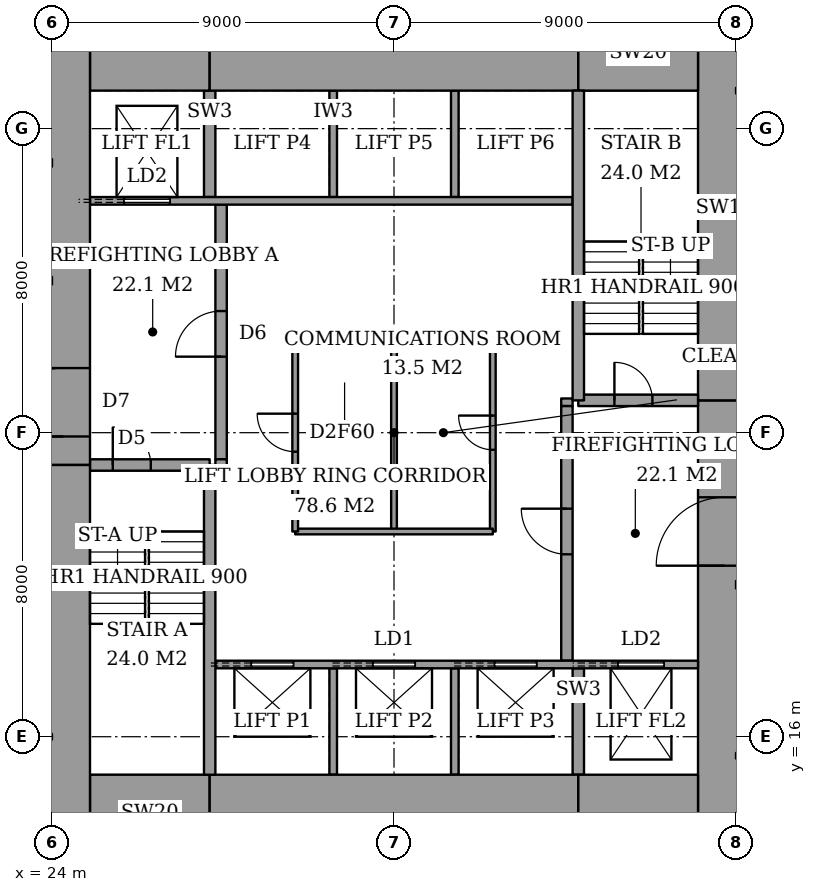
"""IFC4 building model, lengths in metres.
Left out: names, types, materials, properties, quantities, classifications, styles, units other than length and angle.
Written with IfcOpenShell. Run it as: python <this file> out.ifc"""

import sys

from ifc_helpers import new_model, si_unit, direction, frame, frame_2d, origin, place, context, subcontext, project, spatial, rectangle, extrude, element, fill, save


model = new_model("IFC4")
c1 = context("Model", 3, precision=1e-05, world=origin(), true_north=direction((0.0, 1.0)))
c2 = subcontext(c1, "Body", "Model", "MODEL_VIEW")
j1 = project(units=[si_unit("LENGTHUNIT", "METRE"), si_unit("PLANEANGLEUNIT", "RADIAN")], contexts=[c1])
p1 = place(None, origin())
s1 = spatial("IfcSite", under=j1, at=p1, CompositionType="ELEMENT")
p2 = place(p1, origin())
s2 = spatial("IfcBuilding", under=s1, at=p2, CompositionType="ELEMENT")
p3 = place(p2, frame((0.0, 0.0, 36.8)))
s3 = spatial("IfcBuildingStorey", under=s2, at=p3, CompositionType="ELEMENT", Elevation=36.8)
p4 = place(p3, frame((25.0, 14.0, 0.0), z_axis=(0.0, 0.0, 1.0), x_axis=(1.0, 0.0, 0.0)))
e1 = element("IfcWall", 1, at=p4, inside=s3, PredefinedType="SHEAR", context=c2, shape_type="SweptSolid", body=[
    extrude(rectangle(XDim=3.15, YDim=2.0, at=frame_2d((1.575, 0.0))), origin(), (0.0, 0.0, 1.0), 3.6),
])
p5 = place(p3, frame((28.15, 14.0, 0.0), z_axis=(0.0, 0.0, 1.0), x_axis=(1.0, 0.0, 0.0)))
e2 = element("IfcWall", 2, at=p5, inside=s3, PredefinedType="SHEAR", context=c2, shape_type="SweptSolid", body=[
    extrude(rectangle(XDim=9.7, YDim=2.0, at=frame_2d((4.85, 0.0))), origin(), (0.0, 0.0, 1.0), 3.6),
])
for number, where, z_axis, x_axis in (
    (3, (37.85, 14.0, 0.0), (0.0, 0.0, 1.0), (1.0, 0.0, 0.0)),
    (4, (25.0, 34.0, 0.0), (0.0, 0.0, 1.0), (1.0, 0.0, 0.0)),
):
    element("IfcWall", number, at=place(p3, frame(where, z_axis=z_axis, x_axis=x_axis)), inside=s3, PredefinedType="SHEAR", context=c2, shape_type="SweptSolid", body=[
        extrude(rectangle(XDim=3.15, YDim=2.0, at=frame_2d((1.575, 0.0))), origin(), (0.0, 0.0, 1.0), 3.6),
    ])
p6 = place(p3, frame((28.15, 34.0, 0.0), z_axis=(0.0, 0.0, 1.0), x_axis=(1.0, 0.0, 0.0)))
e5 = element("IfcWall", 5, at=p6, inside=s3, PredefinedType="SHEAR", context=c2, shape_type="SweptSolid", body=[
    extrude(rectangle(XDim=9.7, YDim=2.0, at=frame_2d((4.85, 0.0))), origin(), (0.0, 0.0, 1.0), 3.6),
])
p7 = place(p3, frame((37.85, 34.0, 0.0), z_axis=(0.0, 0.0, 1.0), x_axis=(1.0, 0.0, 0.0)))
e6 = element("IfcWall", 6, at=p7, inside=s3, PredefinedType="SHEAR", context=c2, shape_type="SweptSolid", body=[
    extrude(rectangle(XDim=3.15, YDim=2.0, at=frame_2d((1.575, 0.0))), origin(), (0.0, 0.0, 1.0), 3.6),
])
p8 = place(p3, frame((24.3, 13.0, 0.0), z_axis=(0.0, 0.0, 1.0), x_axis=(0.0, 1.0, 0.0)))
e7 = element("IfcWall", 7, at=p8, inside=s3, PredefinedType="SHEAR", context=c2, shape_type="SweptSolid", body=[
    extrude(rectangle(XDim=10.15, YDim=1.4, at=frame_2d((5.075, 0.0))), origin(), (0.0, 0.0, 1.0), 3.6),
])
p9 = place(p3, frame((24.3, 23.15, 0.0), z_axis=(0.0, 0.0, 1.0), x_axis=(0.0, 1.0, 0.0)))
e8 = element("IfcWall", 8, at=p9, inside=s3, PredefinedType="SHEAR", context=c2, shape_type="SweptSolid", body=[
    extrude(rectangle(XDim=11.85, YDim=1.4, at=frame_2d((5.925, 0.0))), origin(), (0.0, 0.0, 1.0), 3.6),
])
p10 = place(p9, frame((0.75, 0.0, 0.0)))
e9 = element("IfcOpeningElement", 9, at=p10, cuts=e8, PredefinedType="OPENING", context=c2, shape_type="SweptSolid", body=[
    extrude(rectangle(XDim=1.8, YDim=2.4, at=frame_2d((0.9, 1.2))), frame((0.0, 0.71, 0.0), z_axis=(0.0, -1.0, 0.0), x_axis=(1.0, 0.0, 0.0)), (0.0, 0.0, 1.0), 1.42),
])
p11 = place(p3, frame((41.7, 13.0, 0.0), z_axis=(0.0, 0.0, 1.0), x_axis=(0.0, 1.0, 0.0)))
e10 = element("IfcWall", 10, at=p11, inside=s3, PredefinedType="SHEAR", context=c2, shape_type="SweptSolid", body=[
    extrude(rectangle(XDim=11.85, YDim=1.4, at=frame_2d((5.925, 0.0))), origin(), (0.0, 0.0, 1.0), 3.6),
])
p12 = place(p11, frame((7.5, 0.0, 0.0)))
e11 = element("IfcOpeningElement", 11, at=p12, cuts=e10, PredefinedType="OPENING", context=c2, shape_type="SweptSolid", body=[
    extrude(rectangle(XDim=1.8, YDim=2.4, at=frame_2d((0.9, 1.2))), frame((0.0, 0.71, 0.0), z_axis=(0.0, -1.0, 0.0), x_axis=(1.0, 0.0, 0.0)), (0.0, 0.0, 1.0), 1.42),
])
p13 = place(p3, frame((41.7, 24.85, 0.0), z_axis=(0.0, 0.0, 1.0), x_axis=(0.0, 1.0, 0.0)))
e12 = element("IfcWall", 12, at=p13, inside=s3, PredefinedType="SHEAR", context=c2, shape_type="SweptSolid", body=[
    extrude(rectangle(XDim=10.15, YDim=1.4, at=frame_2d((5.075, 0.0))), origin(), (0.0, 0.0, 1.0), 3.6),
])
p14 = place(p3, frame((28.15, 15.0, 0.0), z_axis=(0.0, 0.0, 1.0), x_axis=(0.0, 1.0, 0.0)))
e13 = element("IfcWall", 13, at=p14, inside=s3, PredefinedType="SHEAR", context=c2, shape_type="SweptSolid", body=[
    extrude(rectangle(XDim=8.15, YDim=0.3, at=frame_2d((4.075, 0.0))), origin(), (0.0, 0.0, 1.0), 3.6),
])
p15 = place(p3, frame((25.0, 23.15, 0.0), z_axis=(0.0, 0.0, 1.0), x_axis=(1.0, 0.0, 0.0)))
e14 = element("IfcWall", 14, at=p15, inside=s3, PredefinedType="SHEAR", context=c2, shape_type="SweptSolid", body=[
    extrude(rectangle(XDim=3.15, YDim=0.3, at=frame_2d((1.575, 0.0))), origin(), (0.0, 0.0, 1.0), 3.6),
])
p16 = place(p15, frame((0.6, 0.0, 0.0)))
e15 = element("IfcOpeningElement", 15, at=p16, cuts=e14, PredefinedType="OPENING", context=c2, shape_type="SweptSolid", body=[
    extrude(rectangle(XDim=1.0, YDim=2.1, at=frame_2d((0.5, 1.05))), frame((0.0, 0.16, 0.0), z_axis=(0.0, -1.0, 0.0), x_axis=(1.0, 0.0, 0.0)), (0.0, 0.0, 1.0), 0.32),
])
p17 = place(p3, frame((37.85, 24.85, 0.0), z_axis=(0.0, 0.0, 1.0), x_axis=(0.0, 1.0, 0.0)))
e16 = element("IfcWall", 16, at=p17, inside=s3, PredefinedType="SHEAR", context=c2, shape_type="SweptSolid", body=[
    extrude(rectangle(XDim=8.15, YDim=0.3, at=frame_2d((4.075, 0.0))), origin(), (0.0, 0.0, 1.0), 3.6),
])
p18 = place(p3, frame((37.85, 24.85, 0.0), z_axis=(0.0, 0.0, 1.0), x_axis=(1.0, 0.0, 0.0)))
e17 = element("IfcWall", 17, at=p18, inside=s3, PredefinedType="SHEAR", context=c2, shape_type="SweptSolid", body=[
    extrude(rectangle(XDim=3.15, YDim=0.3, at=frame_2d((1.575, 0.0))), origin(), (0.0, 0.0, 1.0), 3.6),
])
p19 = place(p18, frame((0.95, 0.0, 0.0)))
e18 = element("IfcOpeningElement", 18, at=p19, cuts=e17, PredefinedType="OPENING", context=c2, shape_type="SweptSolid", body=[
    extrude(rectangle(XDim=1.0, YDim=2.1, at=frame_2d((0.5, 1.05))), frame((0.0, 0.16, 0.0), z_axis=(0.0, -1.0, 0.0), x_axis=(1.0, 0.0, 0.0)), (0.0, 0.0, 1.0), 0.32),
])
p20 = place(p3, frame((28.45, 23.3, 0.0), z_axis=(0.0, 0.0, 1.0), x_axis=(0.0, 1.0, 0.0)))
e19 = element("IfcWall", 19, at=p20, inside=s3, PredefinedType="PARTITIONING", context=c2, shape_type="SweptSolid", body=[
    extrude(rectangle(XDim=6.7, YDim=0.3, at=frame_2d((3.35, 0.0))), origin(), (0.0, 0.0, 1.0), 3.6),
])
p21 = place(p20, frame((2.7, 0.0, 0.0)))
e20 = element("IfcOpeningElement", 20, at=p21, cuts=e19, PredefinedType="OPENING", context=c2, shape_type="SweptSolid", body=[
    extrude(rectangle(XDim=1.2, YDim=2.1, at=frame_2d((0.6, 1.05))), frame((0.0, 0.16, 0.0), z_axis=(0.0, -1.0, 0.0), x_axis=(1.0, 0.0, 0.0)), (0.0, 0.0, 1.0), 0.32),
])
p22 = place(p3, frame((37.55, 18.0, 0.0), z_axis=(0.0, 0.0, 1.0), x_axis=(0.0, 1.0, 0.0)))
e21 = element("IfcWall", 21, at=p22, inside=s3, PredefinedType="PARTITIONING", context=c2, shape_type="SweptSolid", body=[
    extrude(rectangle(XDim=6.7, YDim=0.3, at=frame_2d((3.35, 0.0))), origin(), (0.0, 0.0, 1.0), 3.6),
])
p23 = place(p22, frame((2.8, 0.0, 0.0)))
e22 = element("IfcOpeningElement", 22, at=p23, cuts=e21, PredefinedType="OPENING", context=c2, shape_type="SweptSolid", body=[
    extrude(rectangle(XDim=1.2, YDim=2.1, at=frame_2d((0.6, 1.05))), frame((0.0, 0.16, 0.0), z_axis=(0.0, -1.0, 0.0), x_axis=(1.0, 0.0, 0.0)), (0.0, 0.0, 1.0), 0.32),
])
p24 = place(p3, frame((28.3, 17.9, 0.0), z_axis=(0.0, 0.0, 1.0), x_axis=(1.0, 0.0, 0.0)))
e23 = element("IfcWall", 23, at=p24, inside=s3, PredefinedType="PARTITIONING", context=c2, shape_type="SweptSolid", body=[
    extrude(rectangle(XDim=12.7, YDim=0.2, at=frame_2d((6.35, 0.0))), origin(), (0.0, 0.0, 1.0), 3.6),
])
p25 = place(p24, frame((0.95, 0.0, 0.0)))
e24 = element("IfcOpeningElement", 24, at=p25, cuts=e23, PredefinedType="OPENING", context=c2, shape_type="SweptSolid", body=[
    extrude(rectangle(XDim=1.1, YDim=2.1, at=frame_2d((0.55, 1.05))), frame((0.0, 0.11, 0.0), z_axis=(0.0, -1.0, 0.0), x_axis=(1.0, 0.0, 0.0)), (0.0, 0.0, 1.0), 0.22),
])
p26 = place(p24, frame((4.15, 0.0, 0.0)))
e25 = element("IfcOpeningElement", 25, at=p26, cuts=e23, PredefinedType="OPENING", context=c2, shape_type="SweptSolid", body=[
    extrude(rectangle(XDim=1.1, YDim=2.1, at=frame_2d((0.55, 1.05))), frame((0.0, 0.11, 0.0), z_axis=(0.0, -1.0, 0.0), x_axis=(1.0, 0.0, 0.0)), (0.0, 0.0, 1.0), 0.22),
])
p27 = place(p24, frame((7.35, 0.0, 0.0)))
e26 = element("IfcOpeningElement", 26, at=p27, cuts=e23, PredefinedType="OPENING", context=c2, shape_type="SweptSolid", body=[
    extrude(rectangle(XDim=1.1, YDim=2.1, at=frame_2d((0.55, 1.05))), frame((0.0, 0.11, 0.0), z_axis=(0.0, -1.0, 0.0), x_axis=(1.0, 0.0, 0.0)), (0.0, 0.0, 1.0), 0.22),
])
p28 = place(p24, frame((10.6, 0.0, 0.0)))
e27 = element("IfcOpeningElement", 27, at=p28, cuts=e23, PredefinedType="OPENING", context=c2, shape_type="SweptSolid", body=[
    extrude(rectangle(XDim=1.2, YDim=2.1, at=frame_2d((0.6, 1.05))), frame((0.0, 0.11, 0.0), z_axis=(0.0, -1.0, 0.0), x_axis=(1.0, 0.0, 0.0)), (0.0, 0.0, 1.0), 0.22),
])
p29 = place(p3, frame((25.0, 30.1, 0.0), z_axis=(0.0, 0.0, 1.0), x_axis=(1.0, 0.0, 0.0)))
e28 = element("IfcWall", 28, at=p29, inside=s3, PredefinedType="PARTITIONING", context=c2, shape_type="SweptSolid", body=[
    extrude(rectangle(XDim=12.7, YDim=0.2, at=frame_2d((6.35, 0.0))), origin(), (0.0, 0.0, 1.0), 3.6),
])
p30 = place(p29, frame((0.9, 0.0, 0.0)))
e29 = element("IfcOpeningElement", 29, at=p30, cuts=e28, PredefinedType="OPENING", context=c2, shape_type="SweptSolid", body=[
    extrude(rectangle(XDim=1.2, YDim=2.1, at=frame_2d((0.6, 1.05))), frame((0.0, 0.11, 0.0), z_axis=(0.0, -1.0, 0.0), x_axis=(1.0, 0.0, 0.0)), (0.0, 0.0, 1.0), 0.22),
])
for number, where, z_axis, x_axis in (
    (30, (31.4, 15.0, 0.0), (0.0, 0.0, 1.0), (0.0, 1.0, 0.0)),
    (31, (34.6, 15.0, 0.0), (0.0, 0.0, 1.0), (0.0, 1.0, 0.0)),
):
    element("IfcWall", number, at=place(p3, frame(where, z_axis=z_axis, x_axis=x_axis)), inside=s3, PredefinedType="PARTITIONING", context=c2, shape_type="SweptSolid", body=[
        extrude(rectangle(XDim=2.8, YDim=0.2, at=frame_2d((1.4, 0.0))), origin(), (0.0, 0.0, 1.0), 3.6),
    ])
p31 = place(p3, frame((37.85, 15.0, 0.0), z_axis=(0.0, 0.0, 1.0), x_axis=(0.0, 1.0, 0.0)))
e32 = element("IfcWall", 32, at=p31, inside=s3, PredefinedType="SHEAR", context=c2, shape_type="SweptSolid", body=[
    extrude(rectangle(XDim=2.8, YDim=0.3, at=frame_2d((1.4, 0.0))), origin(), (0.0, 0.0, 1.0), 3.6),
])
for number, where, z_axis, x_axis in (
    (33, (31.4, 30.2, 0.0), (0.0, 0.0, 1.0), (0.0, 1.0, 0.0)),
    (34, (34.6, 30.2, 0.0), (0.0, 0.0, 1.0), (0.0, 1.0, 0.0)),
):
    element("IfcWall", number, at=place(p3, frame(where, z_axis=z_axis, x_axis=x_axis)), inside=s3, PredefinedType="PARTITIONING", context=c2, shape_type="SweptSolid", body=[
        extrude(rectangle(XDim=2.8, YDim=0.2, at=frame_2d((1.4, 0.0))), origin(), (0.0, 0.0, 1.0), 3.6),
    ])
p32 = place(p3, frame((28.15, 30.2, 0.0), z_axis=(0.0, 0.0, 1.0), x_axis=(0.0, 1.0, 0.0)))
e35 = element("IfcWall", 35, at=p32, inside=s3, PredefinedType="SHEAR", context=c2, shape_type="SweptSolid", body=[
    extrude(rectangle(XDim=2.8, YDim=0.3, at=frame_2d((1.4, 0.0))), origin(), (0.0, 0.0, 1.0), 3.6),
])
for number, where, z_axis, x_axis in (
    (36, (28.3, 23.2, 0.0), (0.0, 0.0, 1.0), (1.0, 0.0, 0.0)),
    (37, (37.4, 24.8, 0.0), (0.0, 0.0, 1.0), (1.0, 0.0, 0.0)),
):
    element("IfcWall", number, at=place(p3, frame(where, z_axis=z_axis, x_axis=x_axis)), inside=s3, PredefinedType="PARTITIONING", context=c2, shape_type="SweptSolid", body=[
        extrude(rectangle(XDim=0.3, YDim=0.2, at=frame_2d((0.15, 0.0))), origin(), (0.0, 0.0, 1.0), 3.6),
    ])
for number, where, z_axis, x_axis in (
    (38, (30.4, 21.4, 0.0), (0.0, 0.0, 1.0), (1.0, 0.0, 0.0)),
    (39, (30.4, 26.6, 0.0), (0.0, 0.0, 1.0), (1.0, 0.0, 0.0)),
):
    element("IfcWall", number, at=place(p3, frame(where, z_axis=z_axis, x_axis=x_axis)), inside=s3, PredefinedType="PARTITIONING", context=c2, shape_type="SweptSolid", body=[
        extrude(rectangle(XDim=5.2, YDim=0.15, at=frame_2d((2.6, 0.0))), origin(), (0.0, 0.0, 1.0), 3.35),
    ])
p33 = place(p3, frame((30.4, 21.4, 0.0), z_axis=(0.0, 0.0, 1.0), x_axis=(0.0, 1.0, 0.0)))
e40 = element("IfcWall", 40, at=p33, inside=s3, PredefinedType="PARTITIONING", context=c2, shape_type="SweptSolid", body=[
    extrude(rectangle(XDim=5.2, YDim=0.15, at=frame_2d((2.6, 0.0))), origin(), (0.0, 0.0, 1.0), 3.35),
])
p34 = place(p33, frame((2.1, 0.0, 0.0)))
e41 = element("IfcOpeningElement", 41, at=p34, cuts=e40, PredefinedType="OPENING", context=c2, shape_type="SweptSolid", body=[
    extrude(rectangle(XDim=1.0, YDim=2.1, at=frame_2d((0.5, 1.05))), frame((0.0, 0.085, 0.0), z_axis=(0.0, -1.0, 0.0), x_axis=(1.0, 0.0, 0.0)), (0.0, 0.0, 1.0), 0.17),
])
p35 = place(p3, frame((35.6, 21.4, 0.0), z_axis=(0.0, 0.0, 1.0), x_axis=(0.0, 1.0, 0.0)))
e42 = element("IfcWall", 42, at=p35, inside=s3, PredefinedType="PARTITIONING", context=c2, shape_type="SweptSolid", body=[
    extrude(rectangle(XDim=5.2, YDim=0.15, at=frame_2d((2.6, 0.0))), origin(), (0.0, 0.0, 1.0), 3.35),
])
p36 = place(p35, frame((2.15, 0.0, 0.0)))
e43 = element("IfcOpeningElement", 43, at=p36, cuts=e42, PredefinedType="OPENING", context=c2, shape_type="SweptSolid", body=[
    extrude(rectangle(XDim=0.9, YDim=2.1, at=frame_2d((0.45, 1.05))), frame((0.0, 0.085, 0.0), z_axis=(0.0, -1.0, 0.0), x_axis=(1.0, 0.0, 0.0)), (0.0, 0.0, 1.0), 0.17),
])
p37 = place(p3, frame((33.0, 21.4, 0.0), z_axis=(0.0, 0.0, 1.0), x_axis=(0.0, 1.0, 0.0)))
e44 = element("IfcWall", 44, at=p37, inside=s3, PredefinedType="PARTITIONING", context=c2, shape_type="SweptSolid", body=[
    extrude(rectangle(XDim=5.2, YDim=0.15, at=frame_2d((2.6, 0.0))), origin(), (0.0, 0.0, 1.0), 3.35),
])
p38 = place(p16, origin())
e45 = element("IfcDoor", 45, at=p38, inside=s3, OperationType="SINGLE_SWING_RIGHT", PredefinedType="DOOR", context=c2, shape_type="SweptSolid", body=[
    extrude(rectangle(XDim=1.0, YDim=2.1, at=frame_2d((0.5, 1.05))), frame((0.0, 0.025, 0.0), z_axis=(0.0, -1.0, 0.0), x_axis=(1.0, 0.0, 0.0)), (0.0, 0.0, 1.0), 0.05),
])
fill(e15, e45)
p39 = place(p19, origin())
e46 = element("IfcDoor", 46, at=p39, inside=s3, OperationType="SINGLE_SWING_RIGHT", PredefinedType="DOOR", context=c2, shape_type="SweptSolid", body=[
    extrude(rectangle(XDim=1.0, YDim=2.1, at=frame_2d((0.5, 1.05))), frame((0.0, 0.025, 0.0), z_axis=(0.0, -1.0, 0.0), x_axis=(1.0, 0.0, 0.0)), (0.0, 0.0, 1.0), 0.05),
])
fill(e18, e46)
p40 = place(p21, origin())
e47 = element("IfcDoor", 47, at=p40, inside=s3, OperationType="SINGLE_SWING_RIGHT", PredefinedType="DOOR", context=c2, shape_type="SweptSolid", body=[
    extrude(rectangle(XDim=1.2, YDim=2.1, at=frame_2d((0.6, 1.05))), frame((0.0, 0.025, 0.0), z_axis=(0.0, -1.0, 0.0), x_axis=(1.0, 0.0, 0.0)), (0.0, 0.0, 1.0), 0.05),
])
fill(e20, e47)
p41 = place(p23, origin())
e48 = element("IfcDoor", 48, at=p41, inside=s3, OperationType="SINGLE_SWING_LEFT", PredefinedType="DOOR", context=c2, shape_type="SweptSolid", body=[
    extrude(rectangle(XDim=1.2, YDim=2.1, at=frame_2d((0.6, 1.05))), frame((0.0, 0.025, 0.0), z_axis=(0.0, -1.0, 0.0), x_axis=(1.0, 0.0, 0.0)), (0.0, 0.0, 1.0), 0.05),
])
fill(e22, e48)
p42 = place(p10, origin())
e49 = element("IfcDoor", 49, at=p42, inside=s3, OperationType="DOUBLE_DOOR_DOUBLE_SWING", PredefinedType="DOOR", context=c2, shape_type="SweptSolid", body=[
    extrude(rectangle(XDim=1.8, YDim=2.4, at=frame_2d((0.9, 1.2))), frame((0.0, 0.025, 0.0), z_axis=(0.0, -1.0, 0.0), x_axis=(1.0, 0.0, 0.0)), (0.0, 0.0, 1.0), 0.05),
])
fill(e9, e49)
p43 = place(p12, origin())
e50 = element("IfcDoor", 50, at=p43, inside=s3, OperationType="DOUBLE_DOOR_DOUBLE_SWING", PredefinedType="DOOR", context=c2, shape_type="SweptSolid", body=[
    extrude(rectangle(XDim=1.8, YDim=2.4, at=frame_2d((0.9, 1.2))), frame((0.0, 0.025, 0.0), z_axis=(0.0, -1.0, 0.0), x_axis=(1.0, 0.0, 0.0)), (0.0, 0.0, 1.0), 0.05),
])
fill(e11, e50)
p44 = place(p34, origin())
e51 = element("IfcDoor", 51, at=p44, inside=s3, OperationType="SINGLE_SWING_LEFT", PredefinedType="DOOR", context=c2, shape_type="SweptSolid", body=[
    extrude(rectangle(XDim=1.0, YDim=2.1, at=frame_2d((0.5, 1.05))), frame((0.0, 0.025, 0.0), z_axis=(0.0, -1.0, 0.0), x_axis=(1.0, 0.0, 0.0)), (0.0, 0.0, 1.0), 0.05),
])
fill(e41, e51)
p45 = place(p36, origin())
e52 = element("IfcDoor", 52, at=p45, inside=s3, OperationType="SINGLE_SWING_LEFT", PredefinedType="DOOR", context=c2, shape_type="SweptSolid", body=[
    extrude(rectangle(XDim=0.9, YDim=2.1, at=frame_2d((0.45, 1.05))), frame((0.0, 0.025, 0.0), z_axis=(0.0, -1.0, 0.0), x_axis=(1.0, 0.0, 0.0)), (0.0, 0.0, 1.0), 0.05),
])
fill(e43, e52)
p46 = place(p25, origin())
e53 = element("IfcDoor", 53, at=p46, inside=s3, OperationType="SLIDING_TO_LEFT", PredefinedType="DOOR", context=c2, shape_type="SweptSolid", body=[
    extrude(rectangle(XDim=1.1, YDim=2.1, at=frame_2d((0.55, 1.05))), frame((0.0, 0.025, 0.0), z_axis=(0.0, -1.0, 0.0), x_axis=(1.0, 0.0, 0.0)), (0.0, 0.0, 1.0), 0.05),
])
fill(e24, e53)
p47 = place(p26, origin())
e54 = element("IfcDoor", 54, at=p47, inside=s3, OperationType="SLIDING_TO_LEFT", PredefinedType="DOOR", context=c2, shape_type="SweptSolid", body=[
    extrude(rectangle(XDim=1.1, YDim=2.1, at=frame_2d((0.55, 1.05))), frame((0.0, 0.025, 0.0), z_axis=(0.0, -1.0, 0.0), x_axis=(1.0, 0.0, 0.0)), (0.0, 0.0, 1.0), 0.05),
])
fill(e25, e54)
p48 = place(p27, origin())
e55 = element("IfcDoor", 55, at=p48, inside=s3, OperationType="SLIDING_TO_LEFT", PredefinedType="DOOR", context=c2, shape_type="SweptSolid", body=[
    extrude(rectangle(XDim=1.1, YDim=2.1, at=frame_2d((0.55, 1.05))), frame((0.0, 0.025, 0.0), z_axis=(0.0, -1.0, 0.0), x_axis=(1.0, 0.0, 0.0)), (0.0, 0.0, 1.0), 0.05),
])
fill(e26, e55)
p49 = place(p30, origin())
e56 = element("IfcDoor", 56, at=p49, inside=s3, OperationType="SLIDING_TO_LEFT", PredefinedType="DOOR", context=c2, shape_type="SweptSolid", body=[
    extrude(rectangle(XDim=1.2, YDim=2.1, at=frame_2d((0.6, 1.05))), frame((0.0, 0.025, 0.0), z_axis=(0.0, -1.0, 0.0), x_axis=(1.0, 0.0, 0.0)), (0.0, 0.0, 1.0), 0.05),
])
fill(e29, e56)
p50 = place(p28, origin())
e57 = element("IfcDoor", 57, at=p50, inside=s3, OperationType="SLIDING_TO_LEFT", PredefinedType="DOOR", context=c2, shape_type="SweptSolid", body=[
    extrude(rectangle(XDim=1.2, YDim=2.1, at=frame_2d((0.6, 1.05))), frame((0.0, 0.025, 0.0), z_axis=(0.0, -1.0, 0.0), x_axis=(1.0, 0.0, 0.0)), (0.0, 0.0, 1.0), 0.05),
])
fill(e27, e57)
save(model, sys.argv[1])
